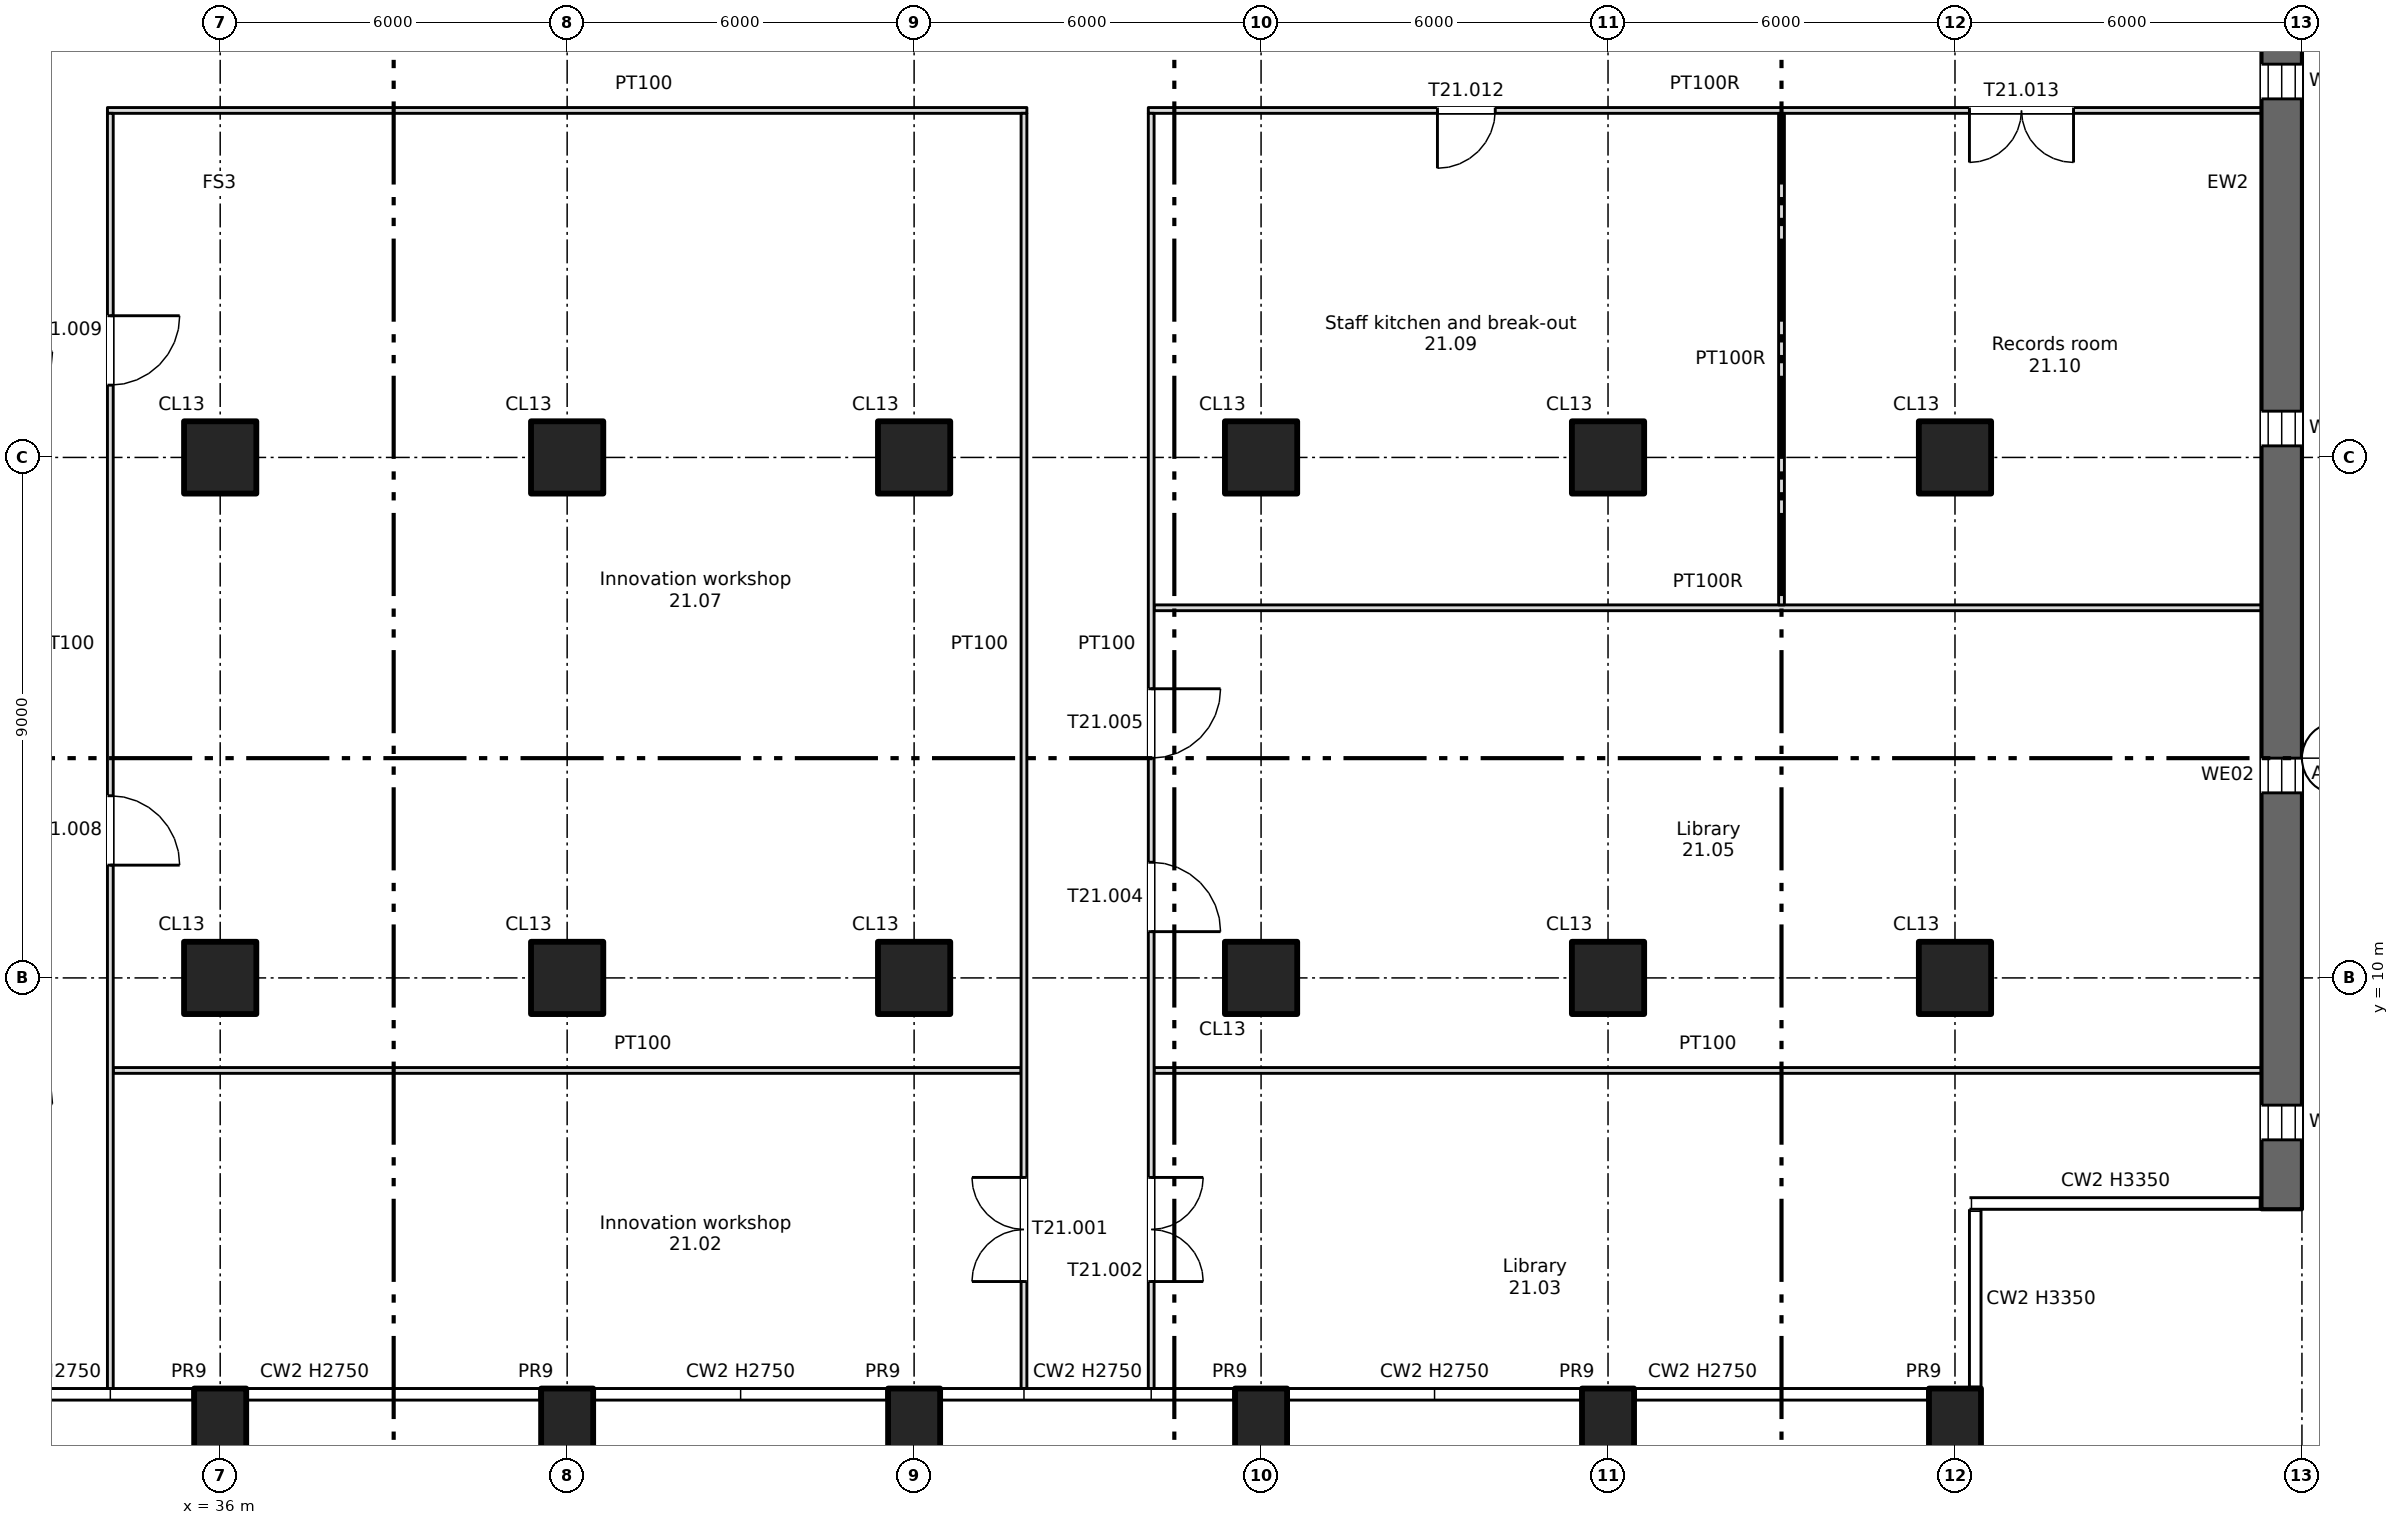
"""IFC4 building model, lengths in metres.
Left out: names, types, materials, properties, quantities, classifications, styles, units other than length and angle.
Written with IfcOpenShell. Run it as: python <this file> out.ifc"""

import sys

from ifc_helpers import new_model, si_unit, direction, frame, frame_2d, origin, origin_2d, place, context, subcontext, project, spatial, rectangle, extrude, element, fill, save


model = new_model("IFC4")
c1 = context("Model", 3, precision=1e-05, world=origin(), true_north=direction((0.0, 1.0)))
c2 = subcontext(c1, "Body", "Model", "MODEL_VIEW")
j1 = project(units=[si_unit("LENGTHUNIT", "METRE"), si_unit("PLANEANGLEUNIT", "RADIAN")], contexts=[c1])
p1 = place(None, origin())
s1 = spatial("IfcSite", under=j1, at=p1, CompositionType="ELEMENT")
p2 = place(p1, origin())
s2 = spatial("IfcBuilding", under=s1, at=p2, CompositionType="ELEMENT")
p3 = place(p2, frame((0.0, 0.0, 136.25)))
s3 = spatial("IfcBuildingStorey", under=s2, at=p3, CompositionType="ELEMENT", Elevation=136.25)
for number, where, z_axis, x_axis in (
    (1, (36.0, 2.2, -0.4), (0.0, 0.0, 1.0), (1.0, 0.0, 0.0)),
    (2, (42.0, 2.2, -0.4), (0.0, 0.0, 1.0), (1.0, 0.0, 0.0)),
    (3, (48.0, 2.2, -0.4), (0.0, 0.0, 1.0), (1.0, 0.0, 0.0)),
    (4, (54.0, 2.2, -0.4), (0.0, 0.0, 1.0), (1.0, 0.0, 0.0)),
    (5, (60.0, 2.2, -0.4), (0.0, 0.0, 1.0), (1.0, 0.0, 0.0)),
    (6, (66.0, 2.2, -0.4), (0.0, 0.0, 1.0), (1.0, 0.0, 0.0)),
):
    element("IfcColumn", number, at=place(p3, frame(where, z_axis=z_axis, x_axis=x_axis)), inside=s3, PredefinedType="COLUMN", context=c2, shape_type="SweptSolid", body=[
        extrude(rectangle(XDim=0.9, YDim=1.4, at=origin_2d()), origin(), (0.0, 0.0, 1.0), 3.75),
    ])
for number, where, z_axis, x_axis in (
    (7, (36.0, 10.0, 0.0), (0.0, 0.0, 1.0), (1.0, 0.0, 0.0)),
    (8, (36.0, 19.0, 0.0), (0.0, 0.0, 1.0), (1.0, 0.0, 0.0)),
    (9, (42.0, 10.0, 0.0), (0.0, 0.0, 1.0), (1.0, 0.0, 0.0)),
    (10, (42.0, 19.0, 0.0), (0.0, 0.0, 1.0), (1.0, 0.0, 0.0)),
    (11, (48.0, 10.0, 0.0), (0.0, 0.0, 1.0), (1.0, 0.0, 0.0)),
    (12, (48.0, 19.0, 0.0), (0.0, 0.0, 1.0), (1.0, 0.0, 0.0)),
    (13, (54.0, 10.0, 0.0), (0.0, 0.0, 1.0), (1.0, 0.0, 0.0)),
    (14, (54.0, 19.0, 0.0), (0.0, 0.0, 1.0), (1.0, 0.0, 0.0)),
    (15, (60.0, 10.0, 0.0), (0.0, 0.0, 1.0), (1.0, 0.0, 0.0)),
    (16, (60.0, 19.0, 0.0), (0.0, 0.0, 1.0), (1.0, 0.0, 0.0)),
    (17, (66.0, 10.0, 0.0), (0.0, 0.0, 1.0), (1.0, 0.0, 0.0)),
    (18, (66.0, 19.0, 0.0), (0.0, 0.0, 1.0), (1.0, 0.0, 0.0)),
):
    element("IfcColumn", number, at=place(p3, frame(where, z_axis=z_axis, x_axis=x_axis)), inside=s3, PredefinedType="COLUMN", context=c2, shape_type="SweptSolid", body=[
        extrude(rectangle(XDim=1.25, YDim=1.25, at=origin_2d()), origin(), (0.0, 0.0, 1.0), 3.35),
    ])
p4 = place(p3, frame((71.65, 6.0, 0.0), z_axis=(0.0, 0.0, 1.0), x_axis=(0.0, 1.0, 0.0)))
e19 = element("IfcWall", 19, at=p4, inside=s3, PredefinedType="SHEAR", context=c2, shape_type="SweptSolid", body=[
    extrude(rectangle(XDim=35.5, YDim=0.7, at=frame_2d((17.75, 0.0))), origin(), (0.0, 0.0, 1.0), 3.35),
])
p5 = place(p4, frame((1.2, 0.0, 0.6)))
e20 = element("IfcOpeningElement", 20, at=p5, cuts=e19, PredefinedType="OPENING", context=c2, shape_type="SweptSolid", body=[
    extrude(rectangle(XDim=0.6, YDim=2.4, at=frame_2d((0.3, 1.2))), frame((0.0, 0.36, 0.0), z_axis=(0.0, -1.0, 0.0), x_axis=(1.0, 0.0, 0.0)), (0.0, 0.0, 1.0), 0.72),
])
p6 = place(p4, frame((7.2, 0.0, 0.6)))
e21 = element("IfcOpeningElement", 21, at=p6, cuts=e19, PredefinedType="OPENING", context=c2, shape_type="SweptSolid", body=[
    extrude(rectangle(XDim=0.6, YDim=2.4, at=frame_2d((0.3, 1.2))), frame((0.0, 0.36, 0.0), z_axis=(0.0, -1.0, 0.0), x_axis=(1.0, 0.0, 0.0)), (0.0, 0.0, 1.0), 0.72),
])
p7 = place(p4, frame((13.2, 0.0, 0.6)))
e22 = element("IfcOpeningElement", 22, at=p7, cuts=e19, PredefinedType="OPENING", context=c2, shape_type="SweptSolid", body=[
    extrude(rectangle(XDim=0.6, YDim=2.4, at=frame_2d((0.3, 1.2))), frame((0.0, 0.36, 0.0), z_axis=(0.0, -1.0, 0.0), x_axis=(1.0, 0.0, 0.0)), (0.0, 0.0, 1.0), 0.72),
])
p8 = place(p4, frame((19.2, 0.0, 0.6)))
e23 = element("IfcOpeningElement", 23, at=p8, cuts=e19, PredefinedType="OPENING", context=c2, shape_type="SweptSolid", body=[
    extrude(rectangle(XDim=0.6, YDim=2.4, at=frame_2d((0.3, 1.2))), frame((0.0, 0.36, 0.0), z_axis=(0.0, -1.0, 0.0), x_axis=(1.0, 0.0, 0.0)), (0.0, 0.0, 1.0), 0.72),
])
p9 = place(p4, frame((25.2, 0.0, 0.6)))
e24 = element("IfcOpeningElement", 24, at=p9, cuts=e19, PredefinedType="OPENING", context=c2, shape_type="SweptSolid", body=[
    extrude(rectangle(XDim=0.6, YDim=2.4, at=frame_2d((0.3, 1.2))), frame((0.0, 0.36, 0.0), z_axis=(0.0, -1.0, 0.0), x_axis=(1.0, 0.0, 0.0)), (0.0, 0.0, 1.0), 0.72),
])
p10 = place(p4, frame((31.2, 0.0, 0.6)))
e25 = element("IfcOpeningElement", 25, at=p10, cuts=e19, PredefinedType="OPENING", context=c2, shape_type="SweptSolid", body=[
    extrude(rectangle(XDim=0.6, YDim=2.4, at=frame_2d((0.3, 1.2))), frame((0.0, 0.36, 0.0), z_axis=(0.0, -1.0, 0.0), x_axis=(1.0, 0.0, 0.0)), (0.0, 0.0, 1.0), 0.72),
])
p11 = place(p3, frame((34.15, 8.4, 0.0), z_axis=(0.0, 0.0, 1.0), x_axis=(1.0, 0.0, 0.0)))
e26 = element("IfcWall", 26, at=p11, inside=s3, PredefinedType="PARTITIONING", context=c2, shape_type="SweptSolid", body=[
    extrude(rectangle(XDim=15.7, YDim=0.1, at=frame_2d((7.85, 0.0))), origin(), (0.0, 0.0, 1.0), 3.35),
])
for number, where, z_axis, x_axis in (
    (27, (52.15, 8.4, 0.0), (0.0, 0.0, 1.0), (1.0, 0.0, 0.0)),
    (28, (52.15, 16.4, 0.0), (0.0, 0.0, 1.0), (1.0, 0.0, 0.0)),
):
    element("IfcWall", number, at=place(p3, frame(where, z_axis=z_axis, x_axis=x_axis)), inside=s3, PredefinedType="PARTITIONING", context=c2, shape_type="SweptSolid", body=[
        extrude(rectangle(XDim=19.15, YDim=0.1, at=frame_2d((9.575, 0.0))), origin(), (0.0, 0.0, 1.0), 3.35),
    ])
p12 = place(p3, frame((34.05, 25.0, 0.0), z_axis=(0.0, 0.0, 1.0), x_axis=(1.0, 0.0, 0.0)))
e29 = element("IfcWall", 29, at=p12, inside=s3, PredefinedType="PARTITIONING", context=c2, shape_type="SweptSolid", body=[
    extrude(rectangle(XDim=15.9, YDim=0.1, at=frame_2d((7.95, 0.0))), origin(), (0.0, 0.0, 1.0), 3.35),
])
p13 = place(p3, frame((52.05, 25.0, 0.0), z_axis=(0.0, 0.0, 1.0), x_axis=(1.0, 0.0, 0.0)))
e30 = element("IfcWall", 30, at=p13, inside=s3, PredefinedType="PARTITIONING", context=c2, shape_type="SweptSolid", body=[
    extrude(rectangle(XDim=19.25, YDim=0.1, at=frame_2d((9.625, 0.0))), origin(), (0.0, 0.0, 1.0), 3.35),
])
p14 = place(p13, frame((5.0, 0.0, 0.0)))
e31 = element("IfcOpeningElement", 31, at=p14, cuts=e30, PredefinedType="OPENING", context=c2, shape_type="SweptSolid", body=[
    extrude(rectangle(XDim=1.0, YDim=2.1, at=frame_2d((0.5, 1.05))), frame((0.0, 0.06, 0.0), z_axis=(0.0, -1.0, 0.0), x_axis=(1.0, 0.0, 0.0)), (0.0, 0.0, 1.0), 0.12),
])
p15 = place(p13, frame((14.2, 0.0, 0.0)))
e32 = element("IfcOpeningElement", 32, at=p15, cuts=e30, PredefinedType="OPENING", context=c2, shape_type="SweptSolid", body=[
    extrude(rectangle(XDim=1.8, YDim=2.1, at=frame_2d((0.9, 1.05))), frame((0.0, 0.06, 0.0), z_axis=(0.0, -1.0, 0.0), x_axis=(1.0, 0.0, 0.0)), (0.0, 0.0, 1.0), 0.12),
])
p16 = place(p3, frame((34.1, 2.9, 0.0), z_axis=(0.0, 0.0, 1.0), x_axis=(0.0, 1.0, 0.0)))
e33 = element("IfcWall", 33, at=p16, inside=s3, PredefinedType="PARTITIONING", context=c2, shape_type="SweptSolid", body=[
    extrude(rectangle(XDim=22.05, YDim=0.1, at=frame_2d((11.025, 0.0))), origin(), (0.0, 0.0, 1.0), 3.35),
])
p17 = place(p16, frame((9.05, 0.0, 0.0)))
e34 = element("IfcOpeningElement", 34, at=p17, cuts=e33, PredefinedType="OPENING", context=c2, shape_type="SweptSolid", body=[
    extrude(rectangle(XDim=1.2, YDim=2.1, at=frame_2d((0.6, 1.05))), frame((0.0, 0.06, 0.0), z_axis=(0.0, -1.0, 0.0), x_axis=(1.0, 0.0, 0.0)), (0.0, 0.0, 1.0), 0.12),
])
p18 = place(p16, frame((17.35, 0.0, 0.0)))
e35 = element("IfcOpeningElement", 35, at=p18, cuts=e33, PredefinedType="OPENING", context=c2, shape_type="SweptSolid", body=[
    extrude(rectangle(XDim=1.2, YDim=2.1, at=frame_2d((0.6, 1.05))), frame((0.0, 0.06, 0.0), z_axis=(0.0, -1.0, 0.0), x_axis=(1.0, 0.0, 0.0)), (0.0, 0.0, 1.0), 0.12),
])
p19 = place(p3, frame((49.9, 2.9, 0.0), z_axis=(0.0, 0.0, 1.0), x_axis=(0.0, 1.0, 0.0)))
e36 = element("IfcWall", 36, at=p19, inside=s3, PredefinedType="PARTITIONING", context=c2, shape_type="SweptSolid", body=[
    extrude(rectangle(XDim=22.05, YDim=0.1, at=frame_2d((11.025, 0.0))), origin(), (0.0, 0.0, 1.0), 3.35),
])
p20 = place(p19, frame((1.85, 0.0, 0.0)))
e37 = element("IfcOpeningElement", 37, at=p20, cuts=e36, PredefinedType="OPENING", context=c2, shape_type="SweptSolid", body=[
    extrude(rectangle(XDim=1.8, YDim=2.1, at=frame_2d((0.9, 1.05))), frame((0.0, 0.06, 0.0), z_axis=(0.0, -1.0, 0.0), x_axis=(1.0, 0.0, 0.0)), (0.0, 0.0, 1.0), 0.12),
])
p21 = place(p3, frame((52.1, 2.9, 0.0), z_axis=(0.0, 0.0, 1.0), x_axis=(0.0, 1.0, 0.0)))
e38 = element("IfcWall", 38, at=p21, inside=s3, PredefinedType="PARTITIONING", context=c2, shape_type="SweptSolid", body=[
    extrude(rectangle(XDim=22.05, YDim=0.1, at=frame_2d((11.025, 0.0))), origin(), (0.0, 0.0, 1.0), 3.35),
])
p22 = place(p21, frame((1.85, 0.0, 0.0)))
e39 = element("IfcOpeningElement", 39, at=p22, cuts=e38, PredefinedType="OPENING", context=c2, shape_type="SweptSolid", body=[
    extrude(rectangle(XDim=1.8, YDim=2.1, at=frame_2d((0.9, 1.05))), frame((0.0, 0.06, 0.0), z_axis=(0.0, -1.0, 0.0), x_axis=(1.0, 0.0, 0.0)), (0.0, 0.0, 1.0), 0.12),
])
p23 = place(p21, frame((7.9, 0.0, 0.0)))
e40 = element("IfcOpeningElement", 40, at=p23, cuts=e38, PredefinedType="OPENING", context=c2, shape_type="SweptSolid", body=[
    extrude(rectangle(XDim=1.2, YDim=2.1, at=frame_2d((0.6, 1.05))), frame((0.0, 0.06, 0.0), z_axis=(0.0, -1.0, 0.0), x_axis=(1.0, 0.0, 0.0)), (0.0, 0.0, 1.0), 0.12),
])
p24 = place(p21, frame((10.9, 0.0, 0.0)))
e41 = element("IfcOpeningElement", 41, at=p24, cuts=e38, PredefinedType="OPENING", context=c2, shape_type="SweptSolid", body=[
    extrude(rectangle(XDim=1.2, YDim=2.1, at=frame_2d((0.6, 1.05))), frame((0.0, 0.06, 0.0), z_axis=(0.0, -1.0, 0.0), x_axis=(1.0, 0.0, 0.0)), (0.0, 0.0, 1.0), 0.12),
])
p25 = place(p3, frame((63.0, 16.45, 0.0), z_axis=(0.0, 0.0, 1.0), x_axis=(0.0, 1.0, 0.0)))
e42 = element("IfcWall", 42, at=p25, inside=s3, PredefinedType="PARTITIONING", context=c2, shape_type="SweptSolid", body=[
    extrude(rectangle(XDim=8.5, YDim=0.1, at=frame_2d((4.25, 0.0))), origin(), (0.0, 0.0, 1.0), 3.35),
])
p26 = place(p5, origin())
e43 = element("IfcWindow", 43, at=p26, inside=s3, PartitioningType="SINGLE_PANEL", PredefinedType="WINDOW", context=c2, shape_type="SweptSolid", body=[
    extrude(rectangle(XDim=0.6, YDim=2.4, at=frame_2d((0.3, 1.2))), frame((0.0, 0.03, 0.0), z_axis=(0.0, -1.0, 0.0), x_axis=(1.0, 0.0, 0.0)), (0.0, 0.0, 1.0), 0.06),
])
fill(e20, e43)
p27 = place(p6, origin())
e44 = element("IfcWindow", 44, at=p27, inside=s3, PartitioningType="SINGLE_PANEL", PredefinedType="WINDOW", context=c2, shape_type="SweptSolid", body=[
    extrude(rectangle(XDim=0.6, YDim=2.4, at=frame_2d((0.3, 1.2))), frame((0.0, 0.03, 0.0), z_axis=(0.0, -1.0, 0.0), x_axis=(1.0, 0.0, 0.0)), (0.0, 0.0, 1.0), 0.06),
])
fill(e21, e44)
p28 = place(p7, origin())
e45 = element("IfcWindow", 45, at=p28, inside=s3, PartitioningType="SINGLE_PANEL", PredefinedType="WINDOW", context=c2, shape_type="SweptSolid", body=[
    extrude(rectangle(XDim=0.6, YDim=2.4, at=frame_2d((0.3, 1.2))), frame((0.0, 0.03, 0.0), z_axis=(0.0, -1.0, 0.0), x_axis=(1.0, 0.0, 0.0)), (0.0, 0.0, 1.0), 0.06),
])
fill(e22, e45)
p29 = place(p8, origin())
e46 = element("IfcWindow", 46, at=p29, inside=s3, PartitioningType="SINGLE_PANEL", PredefinedType="WINDOW", context=c2, shape_type="SweptSolid", body=[
    extrude(rectangle(XDim=0.6, YDim=2.4, at=frame_2d((0.3, 1.2))), frame((0.0, 0.03, 0.0), z_axis=(0.0, -1.0, 0.0), x_axis=(1.0, 0.0, 0.0)), (0.0, 0.0, 1.0), 0.06),
])
fill(e23, e46)
p30 = place(p20, origin())
e47 = element("IfcDoor", 47, at=p30, inside=s3, OperationType="DOUBLE_DOOR_SINGLE_SWING", PredefinedType="DOOR", context=c2, shape_type="SweptSolid", body=[
    extrude(rectangle(XDim=1.8, YDim=2.1, at=frame_2d((0.9, 1.05))), frame((0.0, 0.025, 0.0), z_axis=(0.0, -1.0, 0.0), x_axis=(1.0, 0.0, 0.0)), (0.0, 0.0, 1.0), 0.05),
])
fill(e37, e47)
p31 = place(p22, origin())
e48 = element("IfcDoor", 48, at=p31, inside=s3, OperationType="DOUBLE_DOOR_SINGLE_SWING", PredefinedType="DOOR", context=c2, shape_type="SweptSolid", body=[
    extrude(rectangle(XDim=1.8, YDim=2.1, at=frame_2d((0.9, 1.05))), frame((0.0, 0.025, 0.0), z_axis=(0.0, -1.0, 0.0), x_axis=(1.0, 0.0, 0.0)), (0.0, 0.0, 1.0), 0.05),
])
fill(e39, e48)
p32 = place(p23, origin())
e49 = element("IfcDoor", 49, at=p32, inside=s3, OperationType="SINGLE_SWING_LEFT", PredefinedType="DOOR", context=c2, shape_type="SweptSolid", body=[
    extrude(rectangle(XDim=1.2, YDim=2.1, at=frame_2d((0.6, 1.05))), frame((0.0, 0.025, 0.0), z_axis=(0.0, -1.0, 0.0), x_axis=(1.0, 0.0, 0.0)), (0.0, 0.0, 1.0), 0.05),
])
fill(e40, e49)
p33 = place(p24, origin())
e50 = element("IfcDoor", 50, at=p33, inside=s3, OperationType="SINGLE_SWING_RIGHT", PredefinedType="DOOR", context=c2, shape_type="SweptSolid", body=[
    extrude(rectangle(XDim=1.2, YDim=2.1, at=frame_2d((0.6, 1.05))), frame((0.0, 0.025, 0.0), z_axis=(0.0, -1.0, 0.0), x_axis=(1.0, 0.0, 0.0)), (0.0, 0.0, 1.0), 0.05),
])
fill(e41, e50)
p34 = place(p17, origin())
e51 = element("IfcDoor", 51, at=p34, inside=s3, OperationType="SINGLE_SWING_LEFT", PredefinedType="DOOR", context=c2, shape_type="SweptSolid", body=[
    extrude(rectangle(XDim=1.2, YDim=2.1, at=frame_2d((0.6, 1.05))), frame((0.0, 0.025, 0.0), z_axis=(0.0, -1.0, 0.0), x_axis=(1.0, 0.0, 0.0)), (0.0, 0.0, 1.0), 0.05),
])
fill(e34, e51)
p35 = place(p18, origin())
e52 = element("IfcDoor", 52, at=p35, inside=s3, OperationType="SINGLE_SWING_RIGHT", PredefinedType="DOOR", context=c2, shape_type="SweptSolid", body=[
    extrude(rectangle(XDim=1.2, YDim=2.1, at=frame_2d((0.6, 1.05))), frame((0.0, 0.025, 0.0), z_axis=(0.0, -1.0, 0.0), x_axis=(1.0, 0.0, 0.0)), (0.0, 0.0, 1.0), 0.05),
])
fill(e35, e52)
p36 = place(p14, origin())
e53 = element("IfcDoor", 53, at=p36, inside=s3, OperationType="SINGLE_SWING_LEFT", PredefinedType="DOOR", context=c2, shape_type="SweptSolid", body=[
    extrude(rectangle(XDim=1.0, YDim=2.1, at=frame_2d((0.5, 1.05))), frame((0.0, 0.025, 0.0), z_axis=(0.0, -1.0, 0.0), x_axis=(1.0, 0.0, 0.0)), (0.0, 0.0, 1.0), 0.05),
])
fill(e31, e53)
p37 = place(p15, origin())
e54 = element("IfcDoor", 54, at=p37, inside=s3, OperationType="DOUBLE_DOOR_SINGLE_SWING", PredefinedType="DOOR", context=c2, shape_type="SweptSolid", body=[
    extrude(rectangle(XDim=1.8, YDim=2.1, at=frame_2d((0.9, 1.05))), frame((0.0, 0.025, 0.0), z_axis=(0.0, -1.0, 0.0), x_axis=(1.0, 0.0, 0.0)), (0.0, 0.0, 1.0), 0.05),
])
fill(e32, e54)
save(model, sys.argv[1])
